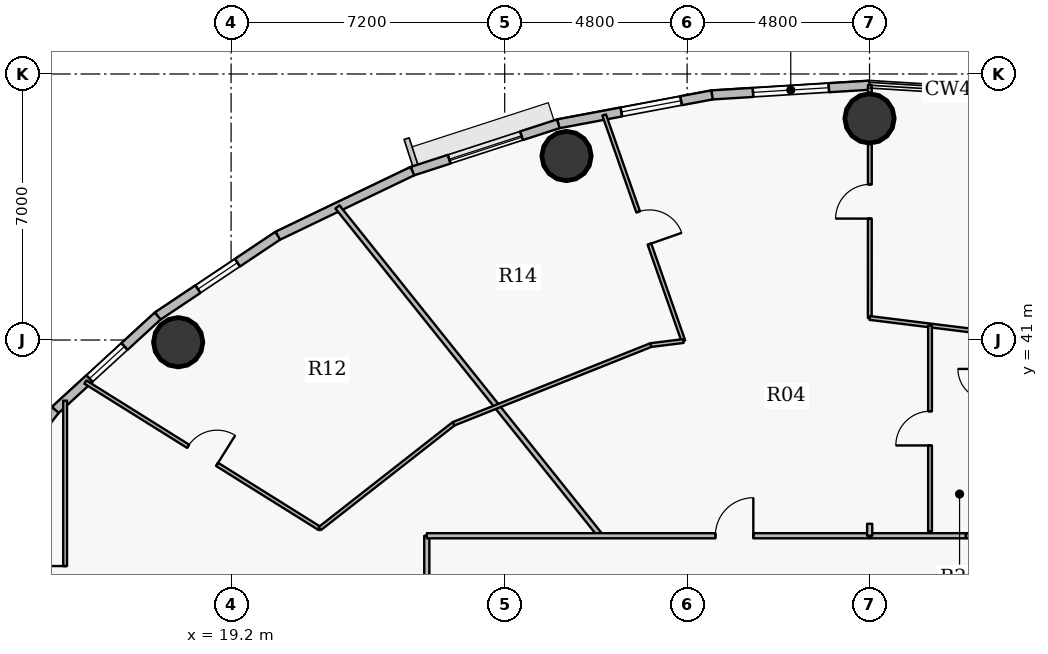
"""IFC4 building model, lengths in metres.
Left out: names, types, materials, properties, quantities, classifications, styles, units other than length and angle.
Written with IfcOpenShell. Run it as: python <this file> out.ifc"""

import sys

from ifc_helpers import new_model, si_unit, direction, frame, frame_2d, origin, origin_2d, place, context, subcontext, project, spatial, rectangle, hollow_circle, extrude, source, transform, mapped, element, fill, save


model = new_model("IFC4")
c1 = context("Model", 3, precision=1e-05, world=origin(), true_north=direction((0.0, 1.0)))
c2 = subcontext(c1, "Body", "Model", "MODEL_VIEW")
j1 = project(units=[si_unit("LENGTHUNIT", "METRE"), si_unit("PLANEANGLEUNIT", "RADIAN")], contexts=[c1])
p1 = place(None, origin())
s1 = spatial("IfcSite", under=j1, at=p1, CompositionType="ELEMENT")
p2 = place(p1, origin())
s2 = spatial("IfcBuilding", under=s1, at=p2, CompositionType="ELEMENT")
p3 = place(p2, frame((0.0, 0.0, 182.4)))
s3 = spatial("IfcBuildingStorey", under=s2, at=p3, CompositionType="ELEMENT", Elevation=182.4)
for number, where, z_axis, x_axis in (
    (1, (36.0, 46.83, 0.0), (0.0, 0.0, 1.0), (1.0, 0.0, 0.0)),
    (2, (28.027, 45.841, 0.0), (0.0, 0.0, 1.0), (1.0, 0.0, 0.0)),
    (3, (17.808, 40.942, 0.0), (0.0, 0.0, 1.0), (1.0, 0.0, 0.0)),
):
    element("IfcColumn", number, at=place(p3, frame(where, z_axis=z_axis, x_axis=x_axis)), inside=s3, PredefinedType="COLUMN", context=c2, shape_type="SweptSolid", body=[
        extrude(hollow_circle(Radius=0.65, WallThickness=0.04, at=origin_2d()), origin(), (0.0, 0.0, 1.0), 3.75),
    ])
p4 = place(p3, frame((31.854, 47.449, 0.0), z_axis=(0.0, 0.0, 1.0), x_axis=(0.998104600619, 0.061540281305, 0.0)))
e4 = element("IfcWall", 4, at=p4, inside=s3, PredefinedType="SOLIDWALL", context=c2, shape_type="SweptSolid", body=[
    extrude(rectangle(XDim=4.154, YDim=0.24, at=frame_2d((2.077, 0.0))), origin(), (0.0, 0.0, 1.0), 3.5),
])
p5 = place(p4, frame((1.082, 0.0, 0.9)))
e5 = element("IfcOpeningElement", 5, at=p5, cuts=e4, PredefinedType="OPENING", context=c2, shape_type="SweptSolid", body=[
    extrude(rectangle(XDim=2.0, YDim=1.75, at=origin_2d()), frame((1.0, 0.13, 0.875), z_axis=(0.0, -1.0, 0.0), x_axis=(1.0, 0.0, 0.0)), (0.0, 0.0, 1.0), 0.26),
])
p6 = place(p3, frame((27.811, 46.689, 0.0), z_axis=(0.0, 0.0, 1.0), x_axis=(0.982788108205, 0.184736391573, 0.0)))
e6 = element("IfcWall", 6, at=p6, inside=s3, PredefinedType="SOLIDWALL", context=c2, shape_type="SweptSolid", body=[
    extrude(rectangle(XDim=4.114, YDim=0.24, at=frame_2d((2.057, 0.0))), origin(), (0.0, 0.0, 1.0), 3.5),
])
p7 = place(p6, frame((1.687, 0.0, 0.9)))
e7 = element("IfcOpeningElement", 7, at=p7, cuts=e6, PredefinedType="OPENING", context=c2, shape_type="SweptSolid", body=[
    extrude(rectangle(XDim=1.6, YDim=1.75, at=origin_2d()), frame((0.8, 0.13, 0.875), z_axis=(0.0, -1.0, 0.0), x_axis=(1.0, 0.0, 0.0)), (0.0, 0.0, 1.0), 0.26),
])
p8 = place(p3, frame((23.97, 45.444, 0.0), z_axis=(0.0, 0.0, 1.0), x_axis=(0.951209870236, 0.30854462038, 0.0)))
e8 = element("IfcWall", 8, at=p8, inside=s3, PredefinedType="SOLIDWALL", context=c2, shape_type="SweptSolid", body=[
    extrude(rectangle(XDim=4.038, YDim=0.24, at=frame_2d((2.019, 0.0))), origin(), (0.0, 0.0, 1.0), 3.5),
])
p9 = place(p8, frame((1.019, 0.0, 0.9)))
e9 = element("IfcOpeningElement", 9, at=p9, cuts=e8, PredefinedType="OPENING", context=c2, shape_type="SweptSolid", body=[
    extrude(rectangle(XDim=2.0, YDim=1.75, at=origin_2d()), frame((1.0, 0.13, 0.875), z_axis=(0.0, -1.0, 0.0), x_axis=(1.0, 0.0, 0.0)), (0.0, 0.0, 1.0), 0.26),
])
p10 = place(p3, frame((20.427, 43.743, 0.0), z_axis=(0.0, 0.0, 1.0), x_axis=(0.901564733809, 0.432644231155, 0.0)))
e10 = element("IfcWall", 10, at=p10, inside=s3, PredefinedType="SOLIDWALL", context=c2, shape_type="SweptSolid", body=[
    extrude(rectangle(XDim=3.93, YDim=0.24, at=frame_2d((1.965, 0.0))), origin(), (0.0, 0.0, 1.0), 3.5),
])
p11 = place(p3, frame((17.268, 41.631, 0.0), z_axis=(0.0, 0.0, 1.0), x_axis=(0.831228998277, 0.555930168657, 0.0)))
e11 = element("IfcWall", 11, at=p11, inside=s3, PredefinedType="SOLIDWALL", context=c2, shape_type="SweptSolid", body=[
    extrude(rectangle(XDim=3.8, YDim=0.24, at=frame_2d((1.9, 0.0))), origin(), (0.0, 0.0, 1.0), 3.5),
])
p12 = place(p11, frame((1.275, 0.0, 0.9)))
e12 = element("IfcOpeningElement", 12, at=p12, cuts=e11, PredefinedType="OPENING", context=c2, shape_type="SweptSolid", body=[
    extrude(rectangle(XDim=1.25, YDim=1.65, at=origin_2d()), frame((0.625, 0.13, 0.825), z_axis=(0.0, -1.0, 0.0), x_axis=(1.0, 0.0, 0.0)), (0.0, 0.0, 1.0), 0.26),
])
p13 = place(p3, frame((14.572, 39.158, 0.0), z_axis=(0.0, 0.0, 1.0), x_axis=(0.737076565834, 0.675809245349, 0.0)))
e13 = element("IfcWall", 13, at=p13, inside=s3, PredefinedType="SOLIDWALL", context=c2, shape_type="SweptSolid", body=[
    extrude(rectangle(XDim=3.658, YDim=0.24, at=frame_2d((1.829, 0.0))), origin(), (0.0, 0.0, 1.0), 3.5),
])
p14 = place(p13, frame((1.224, 0.0, 0.9)))
e14 = element("IfcOpeningElement", 14, at=p14, cuts=e13, PredefinedType="OPENING", context=c2, shape_type="SweptSolid", body=[
    extrude(rectangle(XDim=1.25, YDim=1.65, at=origin_2d()), frame((0.625, 0.13, 0.825), z_axis=(0.0, -1.0, 0.0), x_axis=(1.0, 0.0, 0.0)), (0.0, 0.0, 1.0), 0.26),
])
p15 = place(p3, frame((12.404, 36.388, 0.0), z_axis=(0.0, 0.0, 1.0), x_axis=(0.616287674549, 0.787521112224, 0.0)))
e15 = element("IfcWall", 15, at=p15, inside=s3, PredefinedType="SOLIDWALL", context=c2, shape_type="SweptSolid", body=[
    extrude(rectangle(XDim=3.517, YDim=0.24, at=frame_2d((1.759, 0.0))), origin(), (0.0, 0.0, 1.0), 3.5),
])
p16 = place(p3, frame((14.833, 31.754, 0.0), z_axis=(0.0, 0.0, 1.0), x_axis=(0.0, 1.0, 0.0)))
e16 = element("IfcWall", 16, at=p16, inside=s3, PredefinedType="PARTITIONING", context=c2, shape_type="SweptSolid", body=[
    extrude(rectangle(XDim=7.651, YDim=0.1, at=frame_2d((3.825, 0.0))), origin(), (0.0, 0.0, 1.0), 2.935),
])
p17 = place(p16, frame((2.399, 0.0, 0.0)))
e17 = element("IfcOpeningElement", 17, at=p17, cuts=e16, PredefinedType="OPENING", context=c2, shape_type="SweptSolid", body=[
    extrude(rectangle(XDim=0.9, YDim=2.1, at=origin_2d()), frame((0.45, 0.06, 1.05), z_axis=(0.0, -1.0, 0.0), x_axis=(1.0, 0.0, 0.0)), (0.0, 0.0, 1.0), 0.12),
])
p18 = place(p3, frame((15.366, 39.894, 0.0), z_axis=(0.0, 0.0, 1.0), x_axis=(0.84804732756, -0.529920494242, 0.0)))
e18 = element("IfcWall", 18, at=p18, inside=s3, PredefinedType="PARTITIONING", context=c2, shape_type="SweptSolid", body=[
    extrude(rectangle(XDim=7.274, YDim=0.1, at=frame_2d((3.637, 0.0))), origin(), (0.0, 0.0, 1.0), 2.935),
])
p19 = place(p18, frame((3.187, 0.0, 0.0)))
e19 = element("IfcOpeningElement", 19, at=p19, cuts=e18, PredefinedType="OPENING", context=c2, shape_type="SweptSolid", body=[
    extrude(rectangle(XDim=0.9, YDim=2.1, at=origin_2d()), frame((0.45, 0.06, 1.05), z_axis=(0.0, -1.0, 0.0), x_axis=(1.0, 0.0, 0.0)), (0.0, 0.0, 1.0), 0.12),
])
p20 = place(p3, frame((21.534, 36.039, 0.0), z_axis=(0.0, 0.0, 1.0), x_axis=(0.787313734036, 0.616552580238, 0.0)))
e20 = element("IfcWall", 20, at=p20, inside=s3, PredefinedType="PARTITIONING", context=c2, shape_type="SweptSolid", body=[
    extrude(rectangle(XDim=4.472, YDim=0.1, at=frame_2d((2.236, 0.0))), origin(), (0.0, 0.0, 1.0), 2.935),
])
p21 = place(p3, frame((21.999, 44.503, 0.0), z_axis=(0.0, 0.0, 1.0), x_axis=(0.624673551917, -0.780886005468, 0.0)))
e21 = element("IfcWall", 21, at=p21, inside=s3, PredefinedType="PARTITIONING", context=c2, shape_type="SweptSolid", body=[
    extrude(rectangle(XDim=11.081, YDim=0.135, at=frame_2d((5.541, 0.0))), origin(), (0.0, 0.0, 1.0), 2.935),
])
p22 = place(p3, frame((24.35, 27.95, 0.0), z_axis=(0.0, 0.0, 1.0), x_axis=(0.0, 1.0, 0.0)))
e22 = element("IfcWall", 22, at=p22, inside=s3, PredefinedType="PARTITIONING", context=c2, shape_type="SweptSolid", body=[
    extrude(rectangle(XDim=7.9, YDim=0.135, at=frame_2d((3.95, 0.0))), origin(), (0.0, 0.0, 1.0), 2.935),
])
p23 = place(p22, frame((3.45, 0.0, 0.0)))
e23 = element("IfcOpeningElement", 23, at=p23, cuts=e22, PredefinedType="OPENING", context=c2, shape_type="SweptSolid", body=[
    extrude(rectangle(XDim=1.0, YDim=2.15, at=origin_2d()), frame((0.5, 0.078, 1.075), z_axis=(0.0, -1.0, 0.0), x_axis=(1.0, 0.0, 0.0)), (0.0, 0.0, 1.0), 0.155),
])
p24 = place(p3, frame((24.35, 35.85, 0.0), z_axis=(0.0, 0.0, 1.0), x_axis=(1.0, 0.0, 0.0)))
e24 = element("IfcWall", 24, at=p24, inside=s3, PredefinedType="PARTITIONING", context=c2, shape_type="SweptSolid", body=[
    extrude(rectangle(XDim=11.654, YDim=0.135, at=frame_2d((5.827, 0.0))), origin(), (0.0, 0.0, 1.0), 2.935),
])
p25 = place(p24, frame((7.592, 0.0, 0.0)))
e25 = element("IfcOpeningElement", 25, at=p25, cuts=e24, PredefinedType="OPENING", context=c2, shape_type="SweptSolid", body=[
    extrude(rectangle(XDim=1.0, YDim=2.15, at=origin_2d()), frame((0.5, 0.078, 1.075), z_axis=(0.0, -1.0, 0.0), x_axis=(1.0, 0.0, 0.0)), (0.0, 0.0, 1.0), 0.155),
])
p26 = place(p3, frame((25.055, 38.796, 0.0), z_axis=(0.0, 0.0, 1.0), x_axis=(0.928798710424, 0.370584613166, 0.0)))
e26 = element("IfcWall", 26, at=p26, inside=s3, PredefinedType="PARTITIONING", context=c2, shape_type="SweptSolid", body=[
    extrude(rectangle(XDim=5.589, YDim=0.1, at=frame_2d((2.794, 0.0))), origin(), (0.0, 0.0, 1.0), 2.935),
])
p27 = place(p3, frame((29.018, 46.921, 0.0), z_axis=(0.0, 0.0, 1.0), x_axis=(0.330774858624, -0.943709697366, 0.0)))
e27 = element("IfcWall", 27, at=p27, inside=s3, PredefinedType="PARTITIONING", context=c2, shape_type="SweptSolid", body=[
    extrude(rectangle(XDim=6.302, YDim=0.1, at=frame_2d((3.151, 0.0))), origin(), (0.0, 0.0, 1.0), 2.935),
])
p28 = place(p27, frame((2.701, 0.0, 0.0)))
e28 = element("IfcOpeningElement", 28, at=p28, cuts=e27, PredefinedType="OPENING", context=c2, shape_type="SweptSolid", body=[
    extrude(rectangle(XDim=0.9, YDim=2.1, at=origin_2d()), frame((0.45, 0.06, 1.05), z_axis=(0.0, -1.0, 0.0), x_axis=(1.0, 0.0, 0.0)), (0.0, 0.0, 1.0), 0.12),
])
p29 = place(p3, frame((30.246, 40.867, 0.0), z_axis=(0.0, 0.0, 1.0), x_axis=(0.992394974801, 0.123094329637, 0.0)))
e29 = element("IfcWall", 29, at=p29, inside=s3, PredefinedType="PARTITIONING", context=c2, shape_type="SweptSolid", body=[
    extrude(rectangle(XDim=0.863, YDim=0.1, at=frame_2d((0.431, 0.0))), origin(), (0.0, 0.0, 1.0), 2.935),
])
p30 = place(p3, frame((36.007, 41.58, 0.0), z_axis=(0.0, 0.0, 1.0), x_axis=(0.000477973338, 0.999999885771, 0.0)))
e30 = element("IfcWall", 30, at=p30, inside=s3, PredefinedType="PARTITIONING", context=c2, shape_type="SweptSolid", body=[
    extrude(rectangle(XDim=6.129, YDim=0.1, at=frame_2d((3.065, 0.0))), origin(), (0.0, 0.0, 1.0), 2.935),
])
p31 = place(p30, frame((2.615, 0.0, 0.0)))
e31 = element("IfcOpeningElement", 31, at=p31, cuts=e30, PredefinedType="OPENING", context=c2, shape_type="SweptSolid", body=[
    extrude(rectangle(XDim=0.9, YDim=2.1, at=origin_2d()), frame((0.45, 0.06, 1.05), z_axis=(0.0, -1.0, 0.0), x_axis=(1.0, 0.0, 0.0)), (0.0, 0.0, 1.0), 0.12),
])
p32 = place(p3, frame((36.007, 41.58, 0.0), z_axis=(0.0, 0.0, 1.0), x_axis=(0.992395965764, -0.123086340169, 0.0)))
e32 = element("IfcWall", 32, at=p32, inside=s3, PredefinedType="PARTITIONING", context=c2, shape_type="SweptSolid", body=[
    extrude(rectangle(XDim=4.943, YDim=0.1, at=frame_2d((2.471, 0.0))), origin(), (0.0, 0.0, 1.0), 2.935),
])
p33 = place(p3, frame((37.592, 35.968, 0.0), z_axis=(0.0, 0.0, 1.0), x_axis=(0.0, 1.0, 0.0)))
e33 = element("IfcWall", 33, at=p33, inside=s3, PredefinedType="PARTITIONING", context=c2, shape_type="SweptSolid", body=[
    extrude(rectangle(XDim=5.416, YDim=0.1, at=frame_2d((2.708, 0.0))), origin(), (0.0, 0.0, 1.0), 3.185),
])
p34 = place(p33, frame((2.258, 0.0, 0.0)))
e34 = element("IfcOpeningElement", 34, at=p34, cuts=e33, PredefinedType="OPENING", context=c2, shape_type="SweptSolid", body=[
    extrude(rectangle(XDim=0.9, YDim=2.1, at=origin_2d()), frame((0.45, 0.06, 1.05), z_axis=(0.0, -1.0, 0.0), x_axis=(1.0, 0.0, 0.0)), (0.0, 0.0, 1.0), 0.12),
])
p35 = place(p3, frame((38.541, 35.85, 0.0), z_axis=(0.0, 0.0, 1.0), x_axis=(1.0, 0.0, 0.0)))
e35 = element("IfcWall", 35, at=p35, inside=s3, PredefinedType="PARTITIONING", context=c2, shape_type="SweptSolid", body=[
    extrude(rectangle(XDim=14.913, YDim=0.135, at=frame_2d((7.456, 0.0))), origin(), (0.0, 0.0, 1.0), 2.935),
])
p36 = place(p35, frame((5.868, 0.0, 0.0)))
e36 = element("IfcOpeningElement", 36, at=p36, cuts=e35, PredefinedType="OPENING", context=c2, shape_type="SweptSolid", body=[
    extrude(rectangle(XDim=1.0, YDim=2.15, at=origin_2d()), frame((0.5, 0.078, 1.075), z_axis=(0.0, -1.0, 0.0), x_axis=(1.0, 0.0, 0.0)), (0.0, 0.0, 1.0), 0.155),
])
p37 = place(p3, frame((36.014, 35.85, 0.0), z_axis=(0.0, 0.0, 1.0), x_axis=(1.0, 0.0, 0.0)))
e37 = element("IfcWall", 37, at=p37, inside=s3, PredefinedType="PARTITIONING", context=c2, shape_type="SweptSolid", body=[
    extrude(rectangle(XDim=2.517, YDim=0.135, at=frame_2d((1.259, 0.0))), origin(), (0.0, 0.0, 1.0), 2.935),
])
p38 = place(p3, frame((36.004, 36.165, 0.0), z_axis=(0.0, 0.0, 1.0), x_axis=(0.0, -1.0, 0.0)))
e38 = element("IfcWall", 38, at=p38, inside=s3, PredefinedType="PARTITIONING", context=c2, shape_type="SweptSolid", body=[
    extrude(rectangle(XDim=0.315, YDim=0.135, at=frame_2d((0.157, 0.0))), origin(), (0.0, 0.0, 1.0), 2.935),
])
m1 = source(origin(), c2, "Body", "SweptSolid", [
    extrude(rectangle(XDim=2.0, YDim=1.75, at=origin_2d()), frame((1.0, 0.03, 0.875), z_axis=(0.0, -1.0, 0.0), x_axis=(1.0, 0.0, 0.0)), (0.0, 0.0, 1.0), 0.06),
])
p39 = place(p5, origin())
e39 = element("IfcWindow", 39, at=p39, inside=s3, PartitioningType="DOUBLE_PANEL_VERTICAL", PredefinedType="WINDOW", context=c2, shape_type="MappedRepresentation", body=[
    mapped(m1, transform((0.0, 0.0, 0.0), x_axis=(1.0, 0.0, 0.0), y_axis=(0.0, 1.0, 0.0), z_axis=(0.0, 0.0, 1.0), scale=1.0)),
])
fill(e5, e39)
m2 = source(origin(), c2, "Body", "SweptSolid", [
    extrude(rectangle(XDim=1.6, YDim=1.75, at=origin_2d()), frame((0.8, 0.03, 0.875), z_axis=(0.0, -1.0, 0.0), x_axis=(1.0, 0.0, 0.0)), (0.0, 0.0, 1.0), 0.06),
])
p40 = place(p7, origin())
e40 = element("IfcWindow", 40, at=p40, inside=s3, PartitioningType="DOUBLE_PANEL_VERTICAL", PredefinedType="WINDOW", context=c2, shape_type="MappedRepresentation", body=[
    mapped(m2, transform((0.0, 0.0, 0.0), x_axis=(1.0, 0.0, 0.0), y_axis=(0.0, 1.0, 0.0), z_axis=(0.0, 0.0, 1.0), scale=1.0)),
])
fill(e7, e40)
p41 = place(p9, origin())
e41 = element("IfcWindow", 41, at=p41, inside=s3, PartitioningType="DOUBLE_PANEL_VERTICAL", PredefinedType="WINDOW", context=c2, shape_type="MappedRepresentation", body=[
    mapped(m1, transform((0.0, 0.0, 0.0), x_axis=(1.0, 0.0, 0.0), y_axis=(0.0, 1.0, 0.0), z_axis=(0.0, 0.0, 1.0), scale=1.0)),
])
fill(e9, e41)
m3 = source(origin(), c2, "Body", "SweptSolid", [
    extrude(rectangle(XDim=1.25, YDim=1.65, at=origin_2d()), frame((0.625, 0.03, 0.825), z_axis=(0.0, -1.0, 0.0), x_axis=(1.0, 0.0, 0.0)), (0.0, 0.0, 1.0), 0.06),
])
p42 = place(p14, origin())
e42 = element("IfcWindow", 42, at=p42, inside=s3, PartitioningType="SINGLE_PANEL", PredefinedType="WINDOW", context=c2, shape_type="MappedRepresentation", body=[
    mapped(m3, transform((0.0, 0.0, 0.0), x_axis=(1.0, 0.0, 0.0), y_axis=(0.0, 1.0, 0.0), z_axis=(0.0, 0.0, 1.0), scale=1.0)),
])
fill(e14, e42)
p43 = place(p12, origin())
e43 = element("IfcWindow", 43, at=p43, inside=s3, PartitioningType="SINGLE_PANEL", PredefinedType="WINDOW", context=c2, shape_type="MappedRepresentation", body=[
    mapped(m3, transform((0.0, 0.0, 0.0), x_axis=(1.0, 0.0, 0.0), y_axis=(0.0, 1.0, 0.0), z_axis=(0.0, 0.0, 1.0), scale=1.0)),
])
fill(e12, e43)
m4 = source(origin(), c2, "Body", "SweptSolid", [
    extrude(rectangle(XDim=1.0, YDim=2.15, at=origin_2d()), frame((0.5, 0.025, 1.075), z_axis=(0.0, -1.0, 0.0), x_axis=(1.0, 0.0, 0.0)), (0.0, 0.0, 1.0), 0.05),
])
p44 = place(p25, origin())
e44 = element("IfcDoor", 44, at=p44, inside=s3, OperationType="SINGLE_SWING_RIGHT", PredefinedType="DOOR", context=c2, shape_type="MappedRepresentation", body=[
    mapped(m4, transform((0.0, 0.0, 0.0), x_axis=(1.0, 0.0, 0.0), y_axis=(0.0, 1.0, 0.0), z_axis=(0.0, 0.0, 1.0), scale=1.0)),
])
fill(e25, e44)
m5 = source(origin(), c2, "Body", "SweptSolid", [
    extrude(rectangle(XDim=0.9, YDim=2.1, at=origin_2d()), frame((0.45, 0.025, 1.05), z_axis=(0.0, -1.0, 0.0), x_axis=(1.0, 0.0, 0.0)), (0.0, 0.0, 1.0), 0.05),
])
p45 = place(p31, origin())
e45 = element("IfcDoor", 45, at=p45, inside=s3, OperationType="SINGLE_SWING_LEFT", PredefinedType="DOOR", context=c2, shape_type="MappedRepresentation", body=[
    mapped(m5, transform((0.0, 0.0, 0.0), x_axis=(1.0, 0.0, 0.0), y_axis=(0.0, 1.0, 0.0), z_axis=(0.0, 0.0, 1.0), scale=1.0)),
])
fill(e31, e45)
p46 = place(p28, origin())
e46 = element("IfcDoor", 46, at=p46, inside=s3, OperationType="SINGLE_SWING_RIGHT", PredefinedType="DOOR", context=c2, shape_type="MappedRepresentation", body=[
    mapped(m5, transform((0.0, 0.0, 0.0), x_axis=(1.0, 0.0, 0.0), y_axis=(0.0, 1.0, 0.0), z_axis=(0.0, 0.0, 1.0), scale=1.0)),
])
fill(e28, e46)
p47 = place(p34, origin())
e47 = element("IfcDoor", 47, at=p47, inside=s3, OperationType="SINGLE_SWING_LEFT", PredefinedType="DOOR", context=c2, shape_type="MappedRepresentation", body=[
    mapped(m5, transform((0.0, 0.0, 0.0), x_axis=(1.0, 0.0, 0.0), y_axis=(0.0, 1.0, 0.0), z_axis=(0.0, 0.0, 1.0), scale=1.0)),
])
fill(e34, e47)
p48 = place(p19, origin())
e48 = element("IfcDoor", 48, at=p48, inside=s3, OperationType="SINGLE_SWING_RIGHT", PredefinedType="DOOR", context=c2, shape_type="MappedRepresentation", body=[
    mapped(m5, transform((0.0, 0.0, 0.0), x_axis=(1.0, 0.0, 0.0), y_axis=(0.0, 1.0, 0.0), z_axis=(0.0, 0.0, 1.0), scale=1.0)),
])
fill(e19, e48)
p49 = place(p17, origin())
e49 = element("IfcDoor", 49, at=p49, inside=s3, OperationType="SINGLE_SWING_RIGHT", PredefinedType="DOOR", context=c2, shape_type="MappedRepresentation", body=[
    mapped(m5, transform((0.0, 0.0, 0.0), x_axis=(1.0, 0.0, 0.0), y_axis=(0.0, 1.0, 0.0), z_axis=(0.0, 0.0, 1.0), scale=1.0)),
])
fill(e17, e49)
save(model, sys.argv[1])
